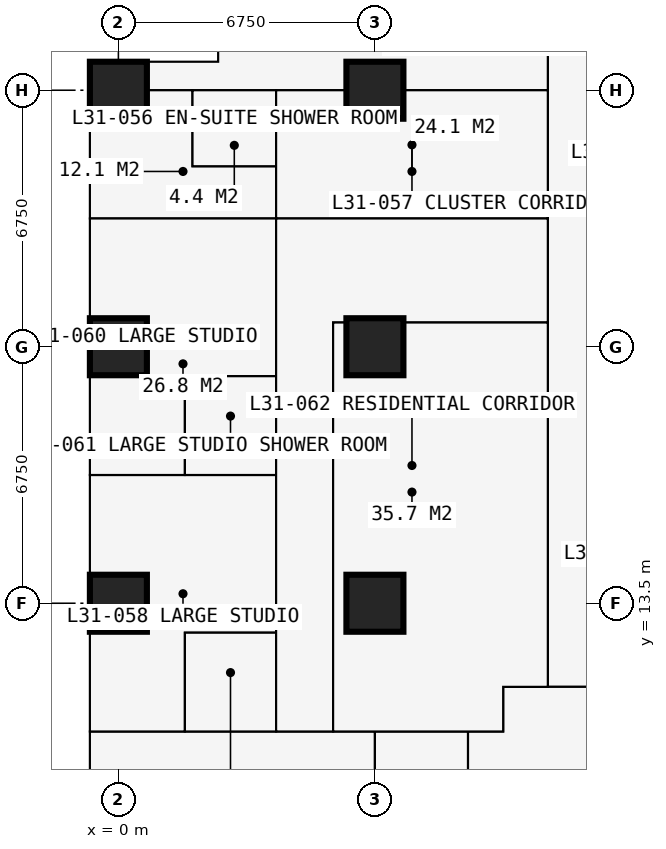
"""IFC4 building model, lengths in metres.
Left out: names, types, materials, properties, quantities, classifications, styles, units other than length and angle.
Written with IfcOpenShell. Run it as: python <this file> out.ifc"""

import sys

from ifc_helpers import new_model, si_unit, direction, frame, frame_2d, origin, origin_2d, place, context, subcontext, project, spatial, rectangle, extrude, element, fill, save


model = new_model("IFC4")
c1 = context("Model", 3, precision=1e-05, world=origin(), true_north=direction((0.0, 1.0)))
c2 = subcontext(c1, "Body", "Model", "MODEL_VIEW")
j1 = project(units=[si_unit("LENGTHUNIT", "METRE"), si_unit("PLANEANGLEUNIT", "RADIAN")], contexts=[c1])
p1 = place(None, origin())
s1 = spatial("IfcSite", under=j1, at=p1, CompositionType="ELEMENT")
p2 = place(p1, origin())
s2 = spatial("IfcBuilding", under=s1, at=p2, CompositionType="ELEMENT")
p3 = place(p2, frame((0.0, 0.0, 116.1)))
s3 = spatial("IfcBuildingStorey", under=s2, at=p3, CompositionType="ELEMENT", Elevation=116.1)
for number, where, z_axis, x_axis in (
    (1, (0.0, 13.5, 0.0), (0.0, 0.0, 1.0), (1.0, 0.0, 0.0)),
    (2, (0.0, 20.25, 0.0), (0.0, 0.0, 1.0), (1.0, 0.0, 0.0)),
    (3, (0.0, 27.0, 0.0), (0.0, 0.0, 1.0), (1.0, 0.0, 0.0)),
    (4, (6.75, 13.5, 0.0), (0.0, 0.0, 1.0), (1.0, 0.0, 0.0)),
    (5, (6.75, 20.25, 0.0), (0.0, 0.0, 1.0), (1.0, 0.0, 0.0)),
    (6, (6.75, 27.0, 0.0), (0.0, 0.0, 1.0), (1.0, 0.0, 0.0)),
):
    element("IfcColumn", number, at=place(p3, frame(where, z_axis=z_axis, x_axis=x_axis)), inside=s3, PredefinedType="COLUMN", context=c2, shape_type="SweptSolid", body=[
        extrude(rectangle(XDim=1.5, YDim=1.5, at=origin_2d()), origin(), (0.0, 0.0, 1.0), 3.6),
    ])
p4 = place(p3, frame((2.625, 31.125, 0.0), z_axis=(0.0, 0.0, 1.0), x_axis=(0.0, -1.0, 0.0)))
e7 = element("IfcWall", 7, at=p4, inside=s3, PredefinedType="SOLIDWALL", context=c2, shape_type="SweptSolid", body=[
    extrude(rectangle(XDim=3.375, YDim=0.3, at=frame_2d((1.688, 0.0))), origin(), (0.0, 0.0, 1.0), 3.375),
])
p5 = place(p4, frame((0.788, 0.0, 0.6)))
e8 = element("IfcOpeningElement", 8, at=p5, cuts=e7, PredefinedType="OPENING", context=c2, shape_type="SweptSolid", body=[
    extrude(rectangle(XDim=1.8, YDim=2.1, at=frame_2d((0.9, 1.05))), frame((0.0, 0.16, 0.0), z_axis=(0.0, -1.0, 0.0), x_axis=(1.0, 0.0, 0.0)), (0.0, 0.0, 1.0), 0.32),
])
p6 = place(p3, frame((2.625, 27.75, 0.0), z_axis=(0.0, 0.0, 1.0), x_axis=(-1.0, 0.0, 0.0)))
e9 = element("IfcWall", 9, at=p6, inside=s3, PredefinedType="SOLIDWALL", context=c2, shape_type="SweptSolid", body=[
    extrude(rectangle(XDim=3.375, YDim=0.3, at=frame_2d((1.688, 0.0))), origin(), (0.0, 0.0, 1.0), 3.375),
])
p7 = place(p6, frame((0.268, 0.0, 0.9)))
e10 = element("IfcOpeningElement", 10, at=p7, cuts=e9, PredefinedType="OPENING", context=c2, shape_type="SweptSolid", body=[
    extrude(rectangle(XDim=1.5, YDim=1.8, at=frame_2d((0.75, 0.9))), frame((0.0, 0.16, 0.0), z_axis=(0.0, -1.0, 0.0), x_axis=(1.0, 0.0, 0.0)), (0.0, 0.0, 1.0), 0.32),
])
p8 = place(p3, frame((-0.75, 13.5, 0.0), z_axis=(0.0, 0.0, 1.0), x_axis=(0.0, 1.0, 0.0)))
e11 = element("IfcWall", 11, at=p8, inside=s3, PredefinedType="SOLIDWALL", context=c2, shape_type="SweptSolid", body=[
    extrude(rectangle(XDim=6.75, YDim=0.15, at=frame_2d((3.375, 0.0))), origin(), (0.0, 0.0, 1.0), 3.375),
])
p9 = place(p8, frame((0.863, 0.0, 0.0)))
e12 = element("IfcOpeningElement", 12, at=p9, cuts=e11, PredefinedType="OPENING", context=c2, shape_type="SweptSolid", body=[
    extrude(rectangle(XDim=1.0, YDim=2.2, at=frame_2d((0.5, 1.1))), frame((0.0, 0.085, 0.0), z_axis=(0.0, -1.0, 0.0), x_axis=(1.0, 0.0, 0.0)), (0.0, 0.0, 1.0), 0.17),
])
p10 = place(p8, frame((1.975, 0.0, 0.9)))
e13 = element("IfcOpeningElement", 13, at=p10, cuts=e11, PredefinedType="OPENING", context=c2, shape_type="SweptSolid", body=[
    extrude(rectangle(XDim=1.2, YDim=1.8, at=frame_2d((0.6, 0.9))), frame((0.0, 0.085, 0.0), z_axis=(0.0, -1.0, 0.0), x_axis=(1.0, 0.0, 0.0)), (0.0, 0.0, 1.0), 0.17),
])
p11 = place(p8, frame((4.887, 0.0, 0.0)))
e14 = element("IfcOpeningElement", 14, at=p11, cuts=e11, PredefinedType="OPENING", context=c2, shape_type="SweptSolid", body=[
    extrude(rectangle(XDim=1.0, YDim=2.2, at=frame_2d((0.5, 1.1))), frame((0.0, 0.085, 0.0), z_axis=(0.0, -1.0, 0.0), x_axis=(1.0, 0.0, 0.0)), (0.0, 0.0, 1.0), 0.17),
])
p12 = place(p8, frame((3.575, 0.0, 0.9)))
e15 = element("IfcOpeningElement", 15, at=p12, cuts=e11, PredefinedType="OPENING", context=c2, shape_type="SweptSolid", body=[
    extrude(rectangle(XDim=1.2, YDim=1.8, at=frame_2d((0.6, 0.9))), frame((0.0, 0.085, 0.0), z_axis=(0.0, -1.0, 0.0), x_axis=(1.0, 0.0, 0.0)), (0.0, 0.0, 1.0), 0.17),
])
p13 = place(p3, frame((-0.85, 16.875, 0.0), z_axis=(0.0, 0.0, 1.0), x_axis=(-1.0, 0.0, 0.0)))
e16 = element("IfcWall", 16, at=p13, inside=s3, PredefinedType="USERDEFINED", context=c2, shape_type="SweptSolid", body=[
    extrude(rectangle(XDim=2.2, YDim=1.0, at=frame_2d((1.1, 0.0))), origin(), (0.0, 0.0, 1.0), 0.9),
])
p14 = place(p3, frame((-0.734, 10.125, 0.0), z_axis=(0.0, 0.0, 1.0), x_axis=(1.0, 0.0, 0.0)))
e17 = element("IfcWall", 17, at=p14, inside=s3, PredefinedType="PARTITIONING", context=c2, shape_type="SweptSolid", body=[
    extrude(rectangle(XDim=10.859, YDim=0.15, at=frame_2d((5.429, 0.0))), origin(), (0.0, 0.0, 1.0), 3.375),
])
p15 = place(p14, frame((5.134, 0.0, 0.0)))
e18 = element("IfcOpeningElement", 18, at=p15, cuts=e17, PredefinedType="OPENING", context=c2, shape_type="SweptSolid", body=[
    extrude(rectangle(XDim=1.0, YDim=2.2, at=frame_2d((0.5, 1.1))), frame((0.0, 0.085, 0.0), z_axis=(0.0, -1.0, 0.0), x_axis=(1.0, 0.0, 0.0)), (0.0, 0.0, 1.0), 0.17),
])
p16 = place(p3, frame((-0.734, 16.875, 0.0), z_axis=(0.0, 0.0, 1.0), x_axis=(1.0, 0.0, 0.0)))
e19 = element("IfcWall", 19, at=p16, inside=s3, PredefinedType="PARTITIONING", context=c2, shape_type="SweptSolid", body=[
    extrude(rectangle(XDim=4.884, YDim=0.175, at=frame_2d((2.442, 0.0))), origin(), (0.0, 0.0, 1.0), 3.375),
])
p17 = place(p16, frame((3.234, 0.0, 0.0)))
e20 = element("IfcOpeningElement", 20, at=p17, cuts=e19, PredefinedType="OPENING", context=c2, shape_type="SweptSolid", body=[
    extrude(rectangle(XDim=0.9, YDim=2.2, at=frame_2d((0.45, 1.1))), frame((0.0, 0.097, 0.0), z_axis=(0.0, -1.0, 0.0), x_axis=(1.0, 0.0, 0.0)), (0.0, 0.0, 1.0), 0.195),
])
p18 = place(p3, frame((-0.734, 23.625, 0.0), z_axis=(0.0, 0.0, 1.0), x_axis=(1.0, 0.0, 0.0)))
e21 = element("IfcWall", 21, at=p18, inside=s3, PredefinedType="PARTITIONING", context=c2, shape_type="SweptSolid", body=[
    extrude(rectangle(XDim=12.034, YDim=0.15, at=frame_2d((6.017, 0.0))), origin(), (0.0, 0.0, 1.0), 3.375),
])
p19 = place(p3, frame((-0.734, 27.0, 0.0), z_axis=(0.0, 0.0, 1.0), x_axis=(1.0, 0.0, 0.0)))
e22 = element("IfcWall", 22, at=p19, inside=s3, PredefinedType="PARTITIONING", context=c2, shape_type="SweptSolid", body=[
    extrude(rectangle(XDim=12.034, YDim=0.15, at=frame_2d((6.017, 0.0))), origin(), (0.0, 0.0, 1.0), 2.806),
])
p20 = place(p19, frame((8.234, 0.0, 0.0)))
e23 = element("IfcOpeningElement", 23, at=p20, cuts=e22, PredefinedType="OPENING", context=c2, shape_type="SweptSolid", body=[
    extrude(rectangle(XDim=1.0, YDim=2.2, at=frame_2d((0.5, 1.1))), frame((0.0, 0.085, 0.0), z_axis=(0.0, -1.0, 0.0), x_axis=(1.0, 0.0, 0.0)), (0.0, 0.0, 1.0), 0.17),
])
p21 = place(p3, frame((1.75, 10.125, 0.0), z_axis=(0.0, 0.0, 1.0), x_axis=(0.0, 1.0, 0.0)))
e24 = element("IfcWall", 24, at=p21, inside=s3, PredefinedType="PARTITIONING", context=c2, shape_type="SweptSolid", body=[
    extrude(rectangle(XDim=2.6, YDim=0.1, at=frame_2d((1.3, 0.0))), origin(), (0.0, 0.0, 1.0), 3.375),
])
p22 = place(p21, frame((0.85, 0.0, 0.0)))
e25 = element("IfcOpeningElement", 25, at=p22, cuts=e24, PredefinedType="OPENING", context=c2, shape_type="SweptSolid", body=[
    extrude(rectangle(XDim=0.9, YDim=2.2, at=frame_2d((0.45, 1.1))), frame((0.0, 0.06, 0.0), z_axis=(0.0, -1.0, 0.0), x_axis=(1.0, 0.0, 0.0)), (0.0, 0.0, 1.0), 0.12),
])
p23 = place(p3, frame((1.75, 12.725, 0.0), z_axis=(0.0, 0.0, 1.0), x_axis=(1.0, 0.0, 0.0)))
e26 = element("IfcWall", 26, at=p23, inside=s3, PredefinedType="PARTITIONING", context=c2, shape_type="SweptSolid", body=[
    extrude(rectangle(XDim=2.4, YDim=0.1, at=frame_2d((1.2, 0.0))), origin(), (0.0, 0.0, 1.0), 3.375),
])
p24 = place(p3, frame((1.75, 16.875, 0.0), z_axis=(0.0, 0.0, 1.0), x_axis=(0.0, 1.0, 0.0)))
e27 = element("IfcWall", 27, at=p24, inside=s3, PredefinedType="PARTITIONING", context=c2, shape_type="SweptSolid", body=[
    extrude(rectangle(XDim=2.6, YDim=0.1, at=frame_2d((1.3, 0.0))), origin(), (0.0, 0.0, 1.0), 3.375),
])
p25 = place(p3, frame((1.75, 19.475, 0.0), z_axis=(0.0, 0.0, 1.0), x_axis=(1.0, 0.0, 0.0)))
e28 = element("IfcWall", 28, at=p25, inside=s3, PredefinedType="PARTITIONING", context=c2, shape_type="SweptSolid", body=[
    extrude(rectangle(XDim=2.4, YDim=0.1, at=frame_2d((1.2, 0.0))), origin(), (0.0, 0.0, 1.0), 3.375),
])
p26 = place(p3, frame((1.95, 25.0, 0.0), z_axis=(0.0, 0.0, 1.0), x_axis=(0.0, 1.0, 0.0)))
e29 = element("IfcWall", 29, at=p26, inside=s3, PredefinedType="PARTITIONING", context=c2, shape_type="SweptSolid", body=[
    extrude(rectangle(XDim=2.0, YDim=0.1, at=frame_2d((1.0, 0.0))), origin(), (0.0, 0.0, 1.0), 3.375),
])
p27 = place(p3, frame((1.95, 25.0, 0.0), z_axis=(0.0, 0.0, 1.0), x_axis=(1.0, 0.0, 0.0)))
e30 = element("IfcWall", 30, at=p27, inside=s3, PredefinedType="PARTITIONING", context=c2, shape_type="SweptSolid", body=[
    extrude(rectangle(XDim=2.2, YDim=0.1, at=frame_2d((1.1, 0.0))), origin(), (0.0, 0.0, 1.0), 3.375),
])
p28 = place(p27, frame((0.65, 0.0, 0.0)))
e31 = element("IfcOpeningElement", 31, at=p28, cuts=e30, PredefinedType="OPENING", context=c2, shape_type="SweptSolid", body=[
    extrude(rectangle(XDim=0.9, YDim=2.2, at=frame_2d((0.45, 1.1))), frame((0.0, 0.06, 0.0), z_axis=(0.0, -1.0, 0.0), x_axis=(1.0, 0.0, 0.0)), (0.0, 0.0, 1.0), 0.12),
])
p29 = place(p3, frame((4.15, 10.125, 0.0), z_axis=(0.0, 0.0, 1.0), x_axis=(0.0, 1.0, 0.0)))
e32 = element("IfcWall", 32, at=p29, inside=s3, PredefinedType="PARTITIONING", context=c2, shape_type="SweptSolid", body=[
    extrude(rectangle(XDim=16.875, YDim=0.1, at=frame_2d((8.438, 0.0))), origin(), (0.0, 0.0, 1.0), 3.375),
])
p30 = place(p29, frame((13.7, 0.0, 0.0)))
e33 = element("IfcOpeningElement", 33, at=p30, cuts=e32, PredefinedType="OPENING", context=c2, shape_type="SweptSolid", body=[
    extrude(rectangle(XDim=0.95, YDim=2.2, at=frame_2d((0.475, 1.1))), frame((0.0, 0.06, 0.0), z_axis=(0.0, -1.0, 0.0), x_axis=(1.0, 0.0, 0.0)), (0.0, 0.0, 1.0), 0.12),
])
p31 = place(p29, frame((4.2, 0.0, 0.0)))
e34 = element("IfcOpeningElement", 34, at=p31, cuts=e32, PredefinedType="OPENING", context=c2, shape_type="SweptSolid", body=[
    extrude(rectangle(XDim=0.95, YDim=2.2, at=frame_2d((0.475, 1.1))), frame((0.0, 0.06, 0.0), z_axis=(0.0, -1.0, 0.0), x_axis=(1.0, 0.0, 0.0)), (0.0, 0.0, 1.0), 0.12),
])
p32 = place(p29, frame((10.95, 0.0, 0.0)))
e35 = element("IfcOpeningElement", 35, at=p32, cuts=e32, PredefinedType="OPENING", context=c2, shape_type="SweptSolid", body=[
    extrude(rectangle(XDim=0.95, YDim=2.2, at=frame_2d((0.475, 1.1))), frame((0.0, 0.06, 0.0), z_axis=(0.0, -1.0, 0.0), x_axis=(1.0, 0.0, 0.0)), (0.0, 0.0, 1.0), 0.12),
])
p33 = place(p3, frame((5.65, 10.125, 0.0), z_axis=(0.0, 0.0, 1.0), x_axis=(0.0, 1.0, 0.0)))
e36 = element("IfcWall", 36, at=p33, inside=s3, PredefinedType="PARTITIONING", context=c2, shape_type="SweptSolid", body=[
    extrude(rectangle(XDim=10.762, YDim=0.15, at=frame_2d((5.381, 0.0))), origin(), (0.0, 0.0, 1.0), 3.375),
])
p34 = place(p33, frame((4.9, 0.0, 0.0)))
e37 = element("IfcOpeningElement", 37, at=p34, cuts=e36, PredefinedType="OPENING", context=c2, shape_type="SweptSolid", body=[
    extrude(rectangle(XDim=0.95, YDim=2.2, at=frame_2d((0.475, 1.1))), frame((0.0, 0.085, 0.0), z_axis=(0.0, -1.0, 0.0), x_axis=(1.0, 0.0, 0.0)), (0.0, 0.0, 1.0), 0.17),
])
p35 = place(p3, frame((5.65, 20.887, 0.0), z_axis=(0.0, 0.0, 1.0), x_axis=(1.0, 0.0, 0.0)))
e38 = element("IfcWall", 38, at=p35, inside=s3, PredefinedType="PARTITIONING", context=c2, shape_type="SweptSolid", body=[
    extrude(rectangle(XDim=5.65, YDim=0.15, at=frame_2d((2.825, 0.0))), origin(), (0.0, 0.0, 1.0), 3.375),
])
p36 = place(p3, frame((6.75, -0.734, 0.0), z_axis=(0.0, 0.0, 1.0), x_axis=(0.0, 1.0, 0.0)))
e39 = element("IfcWall", 39, at=p36, inside=s3, PredefinedType="PARTITIONING", context=c2, shape_type="SweptSolid", body=[
    extrude(rectangle(XDim=10.859, YDim=0.15, at=frame_2d((5.429, 0.0))), origin(), (0.0, 0.0, 1.0), 2.877),
])
p37 = place(p3, frame((9.2, 5.65, 0.0), z_axis=(0.0, 0.0, 1.0), x_axis=(0.0, 1.0, 0.0)))
e40 = element("IfcWall", 40, at=p37, inside=s3, PredefinedType="PARTITIONING", context=c2, shape_type="SweptSolid", body=[
    extrude(rectangle(XDim=4.475, YDim=0.15, at=frame_2d((2.238, 0.0))), origin(), (0.0, 0.0, 1.0), 3.375),
])
p38 = place(p3, frame((10.125, 10.125, 0.0), z_axis=(0.0, 0.0, 1.0), x_axis=(0.0, 1.0, 0.0)))
e41 = element("IfcWall", 41, at=p38, inside=s3, PredefinedType="PARTITIONING", context=c2, shape_type="SweptSolid", body=[
    extrude(rectangle(XDim=1.175, YDim=0.15, at=frame_2d((0.587, 0.0))), origin(), (0.0, 0.0, 1.0), 3.375),
])
p39 = place(p3, frame((10.125, 11.3, 0.0), z_axis=(0.0, 0.0, 1.0), x_axis=(1.0, 0.0, 0.0)))
e42 = element("IfcWall", 42, at=p39, inside=s3, PredefinedType="PARTITIONING", context=c2, shape_type="SweptSolid", body=[
    extrude(rectangle(XDim=20.675, YDim=0.15, at=frame_2d((10.337, 0.0))), origin(), (0.0, 0.0, 1.0), 3.375),
])
p40 = place(p39, frame((8.375, 0.0, 0.0)))
e43 = element("IfcOpeningElement", 43, at=p40, cuts=e42, PredefinedType="OPENING", context=c2, shape_type="SweptSolid", body=[
    extrude(rectangle(XDim=1.0, YDim=2.2, at=frame_2d((0.5, 1.1))), frame((0.0, 0.085, 0.0), z_axis=(0.0, -1.0, 0.0), x_axis=(1.0, 0.0, 0.0)), (0.0, 0.0, 1.0), 0.17),
])
p41 = place(p39, frame((10.975, 0.0, 0.0)))
e44 = element("IfcOpeningElement", 44, at=p41, cuts=e42, PredefinedType="OPENING", context=c2, shape_type="SweptSolid", body=[
    extrude(rectangle(XDim=1.0, YDim=2.2, at=frame_2d((0.5, 1.1))), frame((0.0, 0.085, 0.0), z_axis=(0.0, -1.0, 0.0), x_axis=(1.0, 0.0, 0.0)), (0.0, 0.0, 1.0), 0.17),
])
p42 = place(p39, frame((3.925, 0.0, 0.0)))
e45 = element("IfcOpeningElement", 45, at=p42, cuts=e42, PredefinedType="OPENING", context=c2, shape_type="SweptSolid", body=[
    extrude(rectangle(XDim=0.95, YDim=2.2, at=frame_2d((0.475, 1.1))), frame((0.0, 0.085, 0.0), z_axis=(0.0, -1.0, 0.0), x_axis=(1.0, 0.0, 0.0)), (0.0, 0.0, 1.0), 0.17),
])
p43 = place(p3, frame((11.3, 11.3, 0.0), z_axis=(0.0, 0.0, 1.0), x_axis=(0.0, 1.0, 0.0)))
e46 = element("IfcWall", 46, at=p43, inside=s3, PredefinedType="PARTITIONING", context=c2, shape_type="SweptSolid", body=[
    extrude(rectangle(XDim=19.3, YDim=0.15, at=frame_2d((9.65, 0.0))), origin(), (0.0, 0.0, 1.0), 3.375),
])
p44 = place(p43, frame((13.525, 0.0, 0.0)))
e47 = element("IfcOpeningElement", 47, at=p44, cuts=e46, PredefinedType="OPENING", context=c2, shape_type="SweptSolid", body=[
    extrude(rectangle(XDim=1.0, YDim=2.2, at=frame_2d((0.5, 1.1))), frame((0.0, 0.085, 0.0), z_axis=(0.0, -1.0, 0.0), x_axis=(1.0, 0.0, 0.0)), (0.0, 0.0, 1.0), 0.17),
])
p45 = place(p43, frame((10.438, 0.0, 0.0)))
e48 = element("IfcOpeningElement", 48, at=p45, cuts=e46, PredefinedType="OPENING", context=c2, shape_type="SweptSolid", body=[
    extrude(rectangle(XDim=1.0, YDim=2.2, at=frame_2d((0.5, 1.1))), frame((0.0, 0.085, 0.0), z_axis=(0.0, -1.0, 0.0), x_axis=(1.0, 0.0, 0.0)), (0.0, 0.0, 1.0), 0.17),
])
p46 = place(p7, origin())
e49 = element("IfcWindow", 49, at=p46, inside=s3, PartitioningType="SINGLE_PANEL", PredefinedType="WINDOW", context=c2, shape_type="SweptSolid", body=[
    extrude(rectangle(XDim=1.5, YDim=1.8, at=frame_2d((0.75, 0.9))), frame((0.0, 0.03, 0.0), z_axis=(0.0, -1.0, 0.0), x_axis=(1.0, 0.0, 0.0)), (0.0, 0.0, 1.0), 0.06),
])
fill(e10, e49)
p47 = place(p9, origin())
e50 = element("IfcDoor", 50, at=p47, inside=s3, OperationType="SINGLE_SWING_LEFT", PredefinedType="DOOR", context=c2, shape_type="SweptSolid", body=[
    extrude(rectangle(XDim=1.0, YDim=2.2, at=frame_2d((0.5, 1.1))), frame((0.0, 0.025, 0.0), z_axis=(0.0, -1.0, 0.0), x_axis=(1.0, 0.0, 0.0)), (0.0, 0.0, 1.0), 0.05),
])
fill(e12, e50)
p48 = place(p10, origin())
e51 = element("IfcWindow", 51, at=p48, inside=s3, PartitioningType="SINGLE_PANEL", PredefinedType="WINDOW", context=c2, shape_type="SweptSolid", body=[
    extrude(rectangle(XDim=1.2, YDim=1.8, at=frame_2d((0.6, 0.9))), frame((0.0, 0.03, 0.0), z_axis=(0.0, -1.0, 0.0), x_axis=(1.0, 0.0, 0.0)), (0.0, 0.0, 1.0), 0.06),
])
fill(e13, e51)
p49 = place(p11, origin())
e52 = element("IfcDoor", 52, at=p49, inside=s3, OperationType="SINGLE_SWING_RIGHT", PredefinedType="DOOR", context=c2, shape_type="SweptSolid", body=[
    extrude(rectangle(XDim=1.0, YDim=2.2, at=frame_2d((0.5, 1.1))), frame((0.0, 0.025, 0.0), z_axis=(0.0, -1.0, 0.0), x_axis=(1.0, 0.0, 0.0)), (0.0, 0.0, 1.0), 0.05),
])
fill(e14, e52)
p50 = place(p12, origin())
e53 = element("IfcWindow", 53, at=p50, inside=s3, PartitioningType="SINGLE_PANEL", PredefinedType="WINDOW", context=c2, shape_type="SweptSolid", body=[
    extrude(rectangle(XDim=1.2, YDim=1.8, at=frame_2d((0.6, 0.9))), frame((0.0, 0.03, 0.0), z_axis=(0.0, -1.0, 0.0), x_axis=(1.0, 0.0, 0.0)), (0.0, 0.0, 1.0), 0.06),
])
fill(e15, e53)
p51 = place(p15, origin())
e54 = element("IfcDoor", 54, at=p51, inside=s3, OperationType="SINGLE_SWING_LEFT", PredefinedType="DOOR", context=c2, shape_type="SweptSolid", body=[
    extrude(rectangle(XDim=1.0, YDim=2.2, at=frame_2d((0.5, 1.1))), frame((0.0, 0.025, 0.0), z_axis=(0.0, -1.0, 0.0), x_axis=(1.0, 0.0, 0.0)), (0.0, 0.0, 1.0), 0.05),
])
fill(e18, e54)
p52 = place(p20, origin())
e55 = element("IfcDoor", 55, at=p52, inside=s3, OperationType="SINGLE_SWING_LEFT", PredefinedType="DOOR", context=c2, shape_type="SweptSolid", body=[
    extrude(rectangle(XDim=1.0, YDim=2.2, at=frame_2d((0.5, 1.1))), frame((0.0, 0.025, 0.0), z_axis=(0.0, -1.0, 0.0), x_axis=(1.0, 0.0, 0.0)), (0.0, 0.0, 1.0), 0.05),
])
fill(e23, e55)
p53 = place(p30, origin())
e56 = element("IfcDoor", 56, at=p53, inside=s3, OperationType="SINGLE_SWING_LEFT", PredefinedType="DOOR", context=c2, shape_type="SweptSolid", body=[
    extrude(rectangle(XDim=0.95, YDim=2.2, at=frame_2d((0.475, 1.1))), frame((0.0, 0.025, 0.0), z_axis=(0.0, -1.0, 0.0), x_axis=(1.0, 0.0, 0.0)), (0.0, 0.0, 1.0), 0.05),
])
fill(e33, e56)
p54 = place(p28, origin())
e57 = element("IfcDoor", 57, at=p54, inside=s3, OperationType="SINGLE_SWING_RIGHT", PredefinedType="DOOR", context=c2, shape_type="SweptSolid", body=[
    extrude(rectangle(XDim=0.9, YDim=2.2, at=frame_2d((0.45, 1.1))), frame((0.0, 0.025, 0.0), z_axis=(0.0, -1.0, 0.0), x_axis=(1.0, 0.0, 0.0)), (0.0, 0.0, 1.0), 0.05),
])
fill(e31, e57)
p55 = place(p44, origin())
e58 = element("IfcDoor", 58, at=p55, inside=s3, OperationType="SINGLE_SWING_LEFT", PredefinedType="DOOR", context=c2, shape_type="SweptSolid", body=[
    extrude(rectangle(XDim=1.0, YDim=2.2, at=frame_2d((0.5, 1.1))), frame((0.0, 0.025, 0.0), z_axis=(0.0, -1.0, 0.0), x_axis=(1.0, 0.0, 0.0)), (0.0, 0.0, 1.0), 0.05),
])
fill(e47, e58)
p56 = place(p31, origin())
e59 = element("IfcDoor", 59, at=p56, inside=s3, OperationType="SINGLE_SWING_LEFT", PredefinedType="DOOR", context=c2, shape_type="SweptSolid", body=[
    extrude(rectangle(XDim=0.95, YDim=2.2, at=frame_2d((0.475, 1.1))), frame((0.0, 0.025, 0.0), z_axis=(0.0, -1.0, 0.0), x_axis=(1.0, 0.0, 0.0)), (0.0, 0.0, 1.0), 0.05),
])
fill(e34, e59)
p57 = place(p22, origin())
e60 = element("IfcDoor", 60, at=p57, inside=s3, OperationType="SINGLE_SWING_RIGHT", PredefinedType="DOOR", context=c2, shape_type="SweptSolid", body=[
    extrude(rectangle(XDim=0.9, YDim=2.2, at=frame_2d((0.45, 1.1))), frame((0.0, 0.025, 0.0), z_axis=(0.0, -1.0, 0.0), x_axis=(1.0, 0.0, 0.0)), (0.0, 0.0, 1.0), 0.05),
])
fill(e25, e60)
p58 = place(p32, origin())
e61 = element("IfcDoor", 61, at=p58, inside=s3, OperationType="SINGLE_SWING_LEFT", PredefinedType="DOOR", context=c2, shape_type="SweptSolid", body=[
    extrude(rectangle(XDim=0.95, YDim=2.2, at=frame_2d((0.475, 1.1))), frame((0.0, 0.025, 0.0), z_axis=(0.0, -1.0, 0.0), x_axis=(1.0, 0.0, 0.0)), (0.0, 0.0, 1.0), 0.05),
])
fill(e35, e61)
p59 = place(p17, origin())
e62 = element("IfcDoor", 62, at=p59, inside=s3, OperationType="SINGLE_SWING_RIGHT", PredefinedType="DOOR", context=c2, shape_type="SweptSolid", body=[
    extrude(rectangle(XDim=0.9, YDim=2.2, at=frame_2d((0.45, 1.1))), frame((0.0, 0.025, 0.0), z_axis=(0.0, -1.0, 0.0), x_axis=(1.0, 0.0, 0.0)), (0.0, 0.0, 1.0), 0.05),
])
fill(e20, e62)
p60 = place(p45, origin())
e63 = element("IfcDoor", 63, at=p60, inside=s3, OperationType="SINGLE_SWING_LEFT", PredefinedType="DOOR", context=c2, shape_type="SweptSolid", body=[
    extrude(rectangle(XDim=1.0, YDim=2.2, at=frame_2d((0.5, 1.1))), frame((0.0, 0.025, 0.0), z_axis=(0.0, -1.0, 0.0), x_axis=(1.0, 0.0, 0.0)), (0.0, 0.0, 1.0), 0.05),
])
fill(e48, e63)
p61 = place(p34, origin())
e64 = element("IfcDoor", 64, at=p61, inside=s3, OperationType="SINGLE_SWING_LEFT", PredefinedType="DOOR", context=c2, shape_type="SweptSolid", body=[
    extrude(rectangle(XDim=0.95, YDim=2.2, at=frame_2d((0.475, 1.1))), frame((0.0, 0.025, 0.0), z_axis=(0.0, -1.0, 0.0), x_axis=(1.0, 0.0, 0.0)), (0.0, 0.0, 1.0), 0.05),
])
fill(e37, e64)
save(model, sys.argv[1])
